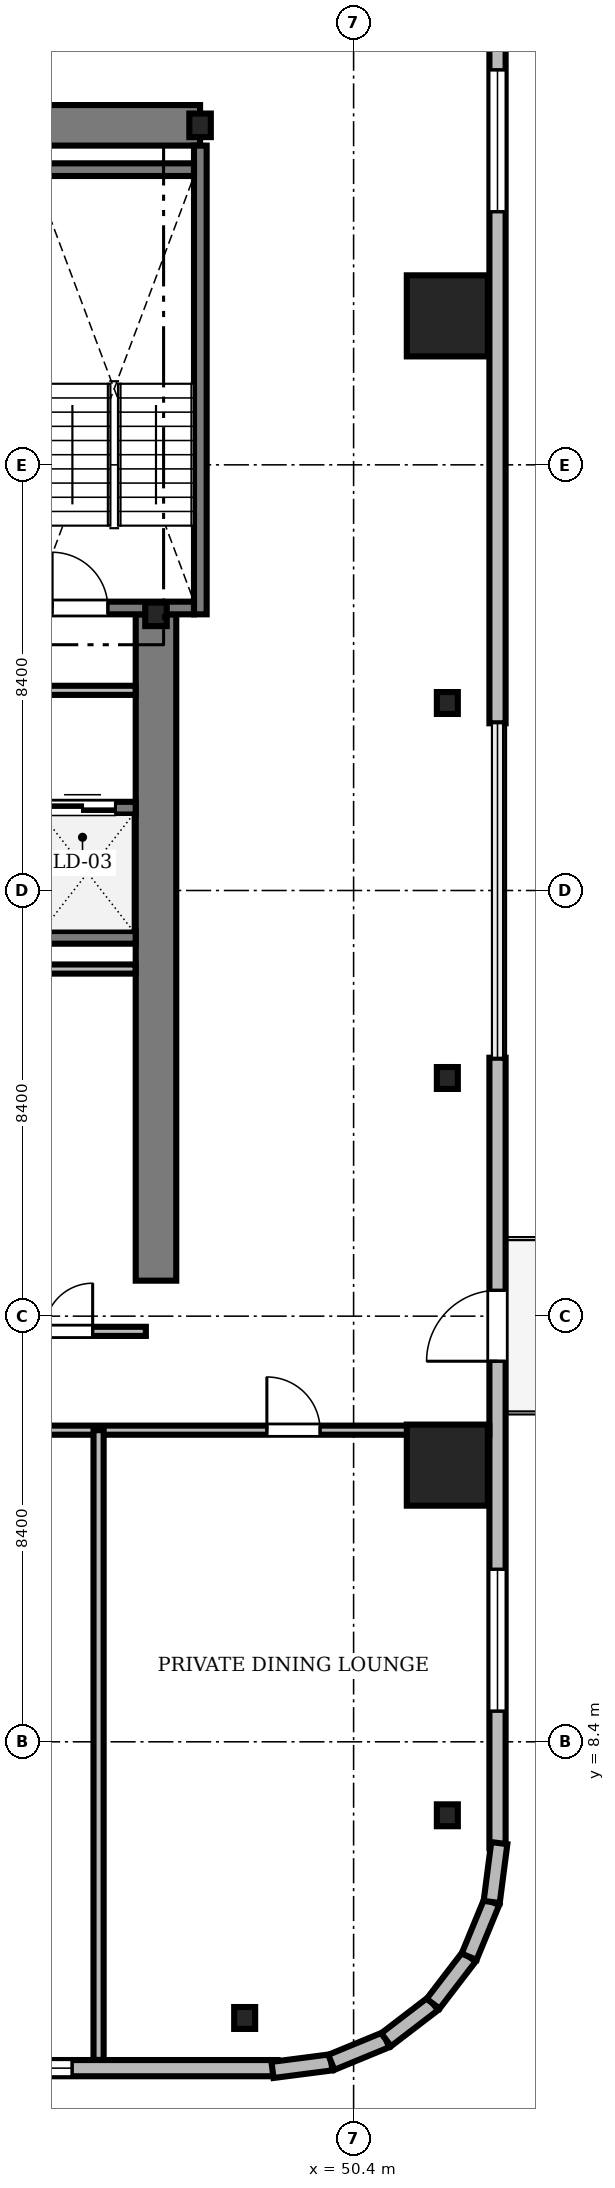
"""IFC4 building model, lengths in metres.
Left out: names, types, materials, properties, quantities, classifications, styles, units other than length and angle.
Written with IfcOpenShell. Run it as: python <this file> out.ifc"""

import sys

from ifc_helpers import new_model, si_unit, direction, frame, frame_2d, origin, origin_2d, place, context, subcontext, project, spatial, rectangle, i_section, extrude, source, transform, mapped, element, fill, save


model = new_model("IFC4")
c1 = context("Model", 3, precision=1e-05, world=origin(), true_north=direction((0.0, 1.0)))
c2 = subcontext(c1, "Body", "Model", "MODEL_VIEW")
j1 = project(units=[si_unit("LENGTHUNIT", "METRE"), si_unit("PLANEANGLEUNIT", "RADIAN")], contexts=[c1])
p1 = place(None, origin())
s1 = spatial("IfcSite", under=j1, at=p1, CompositionType="ELEMENT")
p2 = place(p1, origin())
s2 = spatial("IfcBuilding", under=s1, at=p2, CompositionType="ELEMENT")
p3 = place(p2, frame((0.0, 0.0, 148.3)))
s3 = spatial("IfcBuildingStorey", under=s2, at=p3, CompositionType="ELEMENT", Elevation=148.3)
m1 = source(origin(), c2, "Body", "SweptSolid", [
    extrude(rectangle(XDim=17.52, YDim=0.8, at=frame_2d((8.76, 0.0))), origin(), (0.0, 0.0, 1.0), 3.46),
])
p4 = place(p3, frame((29.85, 40.3, 0.0), z_axis=(0.0, 0.0, 1.0), x_axis=(1.0, 0.0, 0.0)))
e1 = element("IfcWall", 1, at=p4, inside=s3, PredefinedType="SHEAR", context=c2, shape_type="MappedRepresentation", body=[
    mapped(m1, transform((0.0, 0.0, 0.0), scale=1.0)),
])
m2 = source(origin(), c2, "Body", "SweptSolid", [
    extrude(rectangle(XDim=13.15, YDim=0.8, at=frame_2d((6.575, 0.0))), origin(), (0.0, 0.0, 1.0), 3.46),
])
p5 = place(p3, frame((46.5, 17.5, 0.0), z_axis=(0.0, 0.0, 1.0), x_axis=(0.0, 1.0, 0.0)))
e2 = element("IfcWall", 2, at=p5, inside=s3, PredefinedType="SHEAR", context=c2, shape_type="MappedRepresentation", body=[
    mapped(m2, transform((0.0, 0.0, 0.0), scale=1.0)),
])
m3 = source(origin(), c2, "Body", "SweptSolid", [
    extrude(i_section(OverallWidth=0.424, OverallDepth=0.465, WebThickness=0.035, FlangeThickness=0.056, FilletRadius=0.015, at=origin_2d()), origin(), (0.0, 0.0, 1.0), 3.46),
])
for number, where, z_axis, x_axis in (
    (3, (46.5, 30.65, 0.0), (0.0, 0.0, 1.0), (1.0, 0.0, 0.0)),
    (4, (47.37, 40.3, 0.0), (0.0, 0.0, 1.0), (1.0, 0.0, 0.0)),
):
    element("IfcColumn", number, at=place(p3, frame(where, z_axis=z_axis, x_axis=x_axis)), inside=s3, PredefinedType="COLUMN", context=c2, shape_type="MappedRepresentation", body=[
        mapped(m3, transform((0.0, 0.0, 0.0), scale=1.0)),
    ])
m4 = source(origin(), c2, "Body", "SweptSolid", [
    extrude(rectangle(XDim=1.6, YDim=1.6, at=origin_2d()), origin(), (0.0, 0.0, 1.0), 3.46),
])
for number, where, z_axis, x_axis in (
    (5, (52.25, 13.86, 0.0), (0.0, 0.0, 1.0), (1.0, 0.0, 0.0)),
    (6, (52.25, 36.54, 0.0), (0.0, 0.0, 1.0), (1.0, 0.0, 0.0)),
):
    element("IfcColumn", number, at=place(p3, frame(where, z_axis=z_axis, x_axis=x_axis)), inside=s3, PredefinedType="COLUMN", context=c2, shape_type="MappedRepresentation", body=[
        mapped(m4, transform((0.0, 0.0, 0.0), scale=1.0)),
    ])
m5 = source(origin(), c2, "Body", "SweptSolid", [
    extrude(i_section(OverallWidth=0.414, OverallDepth=0.432, WebThickness=0.026, FlangeThickness=0.04, FilletRadius=0.015, at=origin_2d()), origin(), (0.0, 0.0, 1.0), 3.46),
])
for number, where, z_axis, x_axis in (
    (7, (48.25, 2.95, 0.0), (0.0, 0.0, 1.0), (1.0, 0.0, 0.0)),
    (8, (52.25, 6.95, 0.0), (0.0, 0.0, 1.0), (1.0, 0.0, 0.0)),
    (9, (52.25, 21.5, 0.0), (0.0, 0.0, 1.0), (1.0, 0.0, 0.0)),
    (10, (52.25, 28.9, 0.0), (0.0, 0.0, 1.0), (1.0, 0.0, 0.0)),
):
    element("IfcColumn", number, at=place(p3, frame(where, z_axis=z_axis, x_axis=x_axis)), inside=s3, PredefinedType="COLUMN", context=c2, shape_type="MappedRepresentation", body=[
        mapped(m5, transform((0.0, 0.0, 0.0), scale=1.0)),
    ])
m6 = source(origin(), c2, "Body", "SweptSolid", [
    extrude(rectangle(XDim=15.6, YDim=0.32, at=frame_2d((7.8, 0.0))), origin(), (0.0, 0.0, 1.0), 3.46),
])
p6 = place(p3, frame((33.3, 1.96, 0.0), z_axis=(0.0, 0.0, 1.0), x_axis=(1.0, 0.0, 0.0)))
e11 = element("IfcWall", 11, at=p6, inside=s3, PredefinedType="SOLIDWALL", context=c2, shape_type="MappedRepresentation", body=[
    mapped(m6, transform((0.0, 0.0, 0.0), scale=1.0)),
])
m7 = source(origin(), c2, "Body", "SweptSolid", [
    extrude(rectangle(XDim=2.8, YDim=2.4, at=frame_2d((1.4, 1.2))), frame((0.0, 0.17, 0.0), z_axis=(0.0, -1.0, 0.0), x_axis=(1.0, 0.0, 0.0)), (0.0, 0.0, 1.0), 0.34),
])
p7 = place(p6, frame((8.745, 0.0, 0.72)))
e12 = element("IfcOpeningElement", 12, at=p7, cuts=e11, PredefinedType="OPENING", context=c2, shape_type="MappedRepresentation", body=[
    mapped(m7, transform((0.0, 0.0, 0.0), scale=1.0)),
])
p8 = place(p3, frame((53.24, 6.3, 0.0), z_axis=(0.0, 0.0, 1.0), x_axis=(0.0, 1.0, 0.0)))
e13 = element("IfcWall", 13, at=p8, inside=s3, PredefinedType="SOLIDWALL", context=c2, shape_type="MappedRepresentation", body=[
    mapped(m6, transform((0.0, 0.0, 0.0), scale=1.0)),
])
m8 = source(origin(), c2, "Body", "SweptSolid", [
    extrude(rectangle(XDim=1.4, YDim=2.3, at=frame_2d((0.7, 1.15))), frame((0.0, 0.17, 0.0), z_axis=(0.0, -1.0, 0.0), x_axis=(1.0, 0.0, 0.0)), (0.0, 0.0, 1.0), 0.34),
])
p9 = place(p8, frame((9.61, 0.0, 0.0)))
e14 = element("IfcOpeningElement", 14, at=p9, cuts=e13, PredefinedType="OPENING", context=c2, shape_type="MappedRepresentation", body=[
    mapped(m8, transform((0.0, 0.0, 0.0), scale=1.0)),
])
p10 = place(p8, frame((2.705, 0.0, 0.72)))
e15 = element("IfcOpeningElement", 15, at=p10, cuts=e13, PredefinedType="OPENING", context=c2, shape_type="MappedRepresentation", body=[
    mapped(m7, transform((0.0, 0.0, 0.0), scale=1.0)),
])
m9 = source(origin(), c2, "Body", "SweptSolid", [
    extrude(rectangle(XDim=15.6, YDim=0.32, at=frame_2d((7.8, 0.0))), origin(), (0.0, 0.0, 1.0), 3.46),
])
p11 = place(p3, frame((53.24, 28.5, 0.0), z_axis=(0.0, 0.0, 1.0), x_axis=(0.0, 1.0, 0.0)))
e16 = element("IfcWall", 16, at=p11, inside=s3, PredefinedType="SOLIDWALL", context=c2, shape_type="MappedRepresentation", body=[
    mapped(m9, transform((0.0, 0.0, 0.0), scale=1.0)),
])
p12 = place(p11, frame((10.095, 0.0, 0.72)))
e17 = element("IfcOpeningElement", 17, at=p12, cuts=e16, PredefinedType="OPENING", context=c2, shape_type="MappedRepresentation", body=[
    mapped(m7, transform((0.0, 0.0, 0.0), scale=1.0)),
])
m10 = source(origin(), c2, "Body", "SweptSolid", [
    extrude(rectangle(XDim=1.17, YDim=0.32, at=frame_2d((0.585, 0.0))), origin(), (0.0, 0.0, 1.0), 3.46),
])
p13 = place(p3, frame((48.8, 1.925, 0.0), z_axis=(0.0, 0.0, 1.0), x_axis=(0.991762485493, 0.128090485085, 0.0)))
e18 = element("IfcWall", 18, at=p13, inside=s3, PredefinedType="SOLIDWALL", context=c2, shape_type="MappedRepresentation", body=[
    mapped(m10, transform((0.0, 0.0, 0.0), scale=1.0)),
])
m11 = source(origin(), c2, "Body", "SweptSolid", [
    extrude(rectangle(XDim=1.169, YDim=0.32, at=frame_2d((0.585, 0.0))), origin(), (0.0, 0.0, 1.0), 3.46),
])
p14 = place(p3, frame((49.96, 2.074, 0.0), z_axis=(0.0, 0.0, 1.0), x_axis=(0.924479075121, 0.381232789334, 0.0)))
e19 = element("IfcWall", 19, at=p14, inside=s3, PredefinedType="SOLIDWALL", context=c2, shape_type="MappedRepresentation", body=[
    mapped(m11, transform((0.0, 0.0, 0.0), scale=1.0)),
])
m12 = source(origin(), c2, "Body", "SweptSolid", [
    extrude(rectangle(XDim=1.169, YDim=0.32, at=frame_2d((0.584, 0.0))), origin(), (0.0, 0.0, 1.0), 3.46),
])
p15 = place(p3, frame((51.041, 2.52, 0.0), z_axis=(0.0, 0.0, 1.0), x_axis=(0.793663520347, 0.608356981114, 0.0)))
e20 = element("IfcWall", 20, at=p15, inside=s3, PredefinedType="SOLIDWALL", context=c2, shape_type="MappedRepresentation", body=[
    mapped(m12, transform((0.0, 0.0, 0.0), scale=1.0)),
])
m13 = source(origin(), c2, "Body", "SweptSolid", [
    extrude(rectangle(XDim=1.169, YDim=0.32, at=frame_2d((0.584, 0.0))), origin(), (0.0, 0.0, 1.0), 3.46),
])
for number, where, z_axis, x_axis in (
    (21, (51.969, 3.231, 0.0), (0.0, 0.0, 1.0), (0.608, 0.794, 0.0)),
    (22, (52.68, 4.159, 0.0), (0.0, 0.0, 1.0), (0.381, 0.925, 0.0)),
):
    element("IfcWall", number, at=place(p3, frame(where, z_axis=z_axis, x_axis=x_axis)), inside=s3, PredefinedType="SOLIDWALL", context=c2, shape_type="MappedRepresentation", body=[
        mapped(m13, transform((0.0, 0.0, 0.0), scale=1.0)),
    ])
m14 = source(origin(), c2, "Body", "SweptSolid", [
    extrude(rectangle(XDim=1.171, YDim=0.32, at=frame_2d((0.585, 0.0))), origin(), (0.0, 0.0, 1.0), 3.46),
])
p16 = place(p3, frame((53.125, 5.24, 0.0), z_axis=(0.0, 0.0, 1.0), x_axis=(0.128269133229, 0.991739395941, 0.0)))
e23 = element("IfcWall", 23, at=p16, inside=s3, PredefinedType="SOLIDWALL", context=c2, shape_type="MappedRepresentation", body=[
    mapped(m14, transform((0.0, 0.0, 0.0), scale=1.0)),
])
m15 = source(origin(), c2, "Body", "SweptSolid", [
    extrude(rectangle(XDim=9.25, YDim=0.25, at=frame_2d((4.625, 0.0))), origin(), (0.0, 0.0, 1.0), 3.5),
])
p17 = place(p3, frame((47.375, 30.65, 0.0), z_axis=(0.0, 0.0, 1.0), x_axis=(0.0, 1.0, 0.0)))
e24 = element("IfcWall", 24, at=p17, inside=s3, PredefinedType="SOLIDWALL", context=c2, shape_type="MappedRepresentation", body=[
    mapped(m15, transform((0.0, 0.0, 0.0), scale=1.0)),
])
m16 = source(origin(), c2, "Body", "SweptSolid", [
    extrude(rectangle(XDim=3.15, YDim=0.25, at=frame_2d((1.575, 0.0))), origin(), (0.0, 0.0, 1.0), 3.5),
])
p18 = place(p3, frame((44.1, 39.425, 0.0), z_axis=(0.0, 0.0, 1.0), x_axis=(1.0, 0.0, 0.0)))
e25 = element("IfcWall", 25, at=p18, inside=s3, PredefinedType="SOLIDWALL", context=c2, shape_type="MappedRepresentation", body=[
    mapped(m16, transform((0.0, 0.0, 0.0), scale=1.0)),
])
p19 = place(p3, frame((44.1, 30.775, 0.0), z_axis=(0.0, 0.0, 1.0), x_axis=(1.0, 0.0, 0.0)))
e26 = element("IfcWall", 26, at=p19, inside=s3, PredefinedType="SOLIDWALL", context=c2, shape_type="MappedRepresentation", body=[
    mapped(m16, transform((0.0, 0.0, 0.0), scale=1.0)),
])
m17 = source(origin(), c2, "Body", "SweptSolid", [
    extrude(rectangle(XDim=1.1, YDim=2.2, at=frame_2d((0.55, 1.1))), frame((0.0, 0.135, 0.0), z_axis=(0.0, -1.0, 0.0), x_axis=(1.0, 0.0, 0.0)), (0.0, 0.0, 1.0), 0.27),
])
p20 = place(p19, frame((0.35, 0.0, 0.0)))
e27 = element("IfcOpeningElement", 27, at=p20, cuts=e26, PredefinedType="OPENING", context=c2, shape_type="MappedRepresentation", body=[
    mapped(m17, transform((0.0, 0.0, 0.0), scale=1.0)),
])
m18 = source(origin(), c2, "Body", "SweptSolid", [
    extrude(rectangle(XDim=2.1, YDim=0.25, at=frame_2d((1.05, 0.0))), origin(), (0.0, 0.0, 1.0), 3.46),
])
p21 = place(p3, frame((44.0, 24.275, 0.0), z_axis=(0.0, 0.0, 1.0), x_axis=(1.0, 0.0, 0.0)))
e28 = element("IfcWall", 28, at=p21, inside=s3, PredefinedType="SOLIDWALL", context=c2, shape_type="MappedRepresentation", body=[
    mapped(m18, transform((0.0, 0.0, 0.0), scale=1.0)),
])
p22 = place(p3, frame((44.0, 26.825, 0.0), z_axis=(0.0, 0.0, 1.0), x_axis=(1.0, 0.0, 0.0)))
e29 = element("IfcWall", 29, at=p22, inside=s3, PredefinedType="SOLIDWALL", context=c2, shape_type="MappedRepresentation", body=[
    mapped(m18, transform((0.0, 0.0, 0.0), scale=1.0)),
])
m19 = source(origin(), c2, "Body", "SweptSolid", [
    extrude(rectangle(XDim=1.3, YDim=2.3, at=frame_2d((0.65, 1.15))), frame((0.0, 0.135, 0.0), z_axis=(0.0, -1.0, 0.0), x_axis=(1.0, 0.0, 0.0)), (0.0, 0.0, 1.0), 0.27),
])
p23 = place(p22, frame((0.4, 0.0, 0.0)))
e30 = element("IfcOpeningElement", 30, at=p23, cuts=e29, PredefinedType="OPENING", context=c2, shape_type="MappedRepresentation", body=[
    mapped(m19, transform((0.0, 0.0, 0.0), scale=1.0)),
])
m20 = source(origin(), c2, "Body", "SweptSolid", [
    extrude(rectangle(XDim=46.156, YDim=0.18, at=frame_2d((23.078, 0.0))), origin(), (0.0, 0.0, 1.0), 2.702),
])
p24 = place(p3, frame((6.922, 14.55, 0.0), z_axis=(0.0, 0.0, 1.0), x_axis=(1.0, 0.0, 0.0)))
e31 = element("IfcWall", 31, at=p24, inside=s3, PredefinedType="PARTITIONING", context=c2, shape_type="MappedRepresentation", body=[
    mapped(m20, transform((0.0, 0.0, 0.0), scale=1.0)),
])
m21 = source(origin(), c2, "Body", "SweptSolid", [
    extrude(rectangle(XDim=1.05, YDim=2.2, at=frame_2d((0.525, 1.1))), frame((0.0, 0.1, 0.0), z_axis=(0.0, -1.0, 0.0), x_axis=(1.0, 0.0, 0.0)), (0.0, 0.0, 1.0), 0.2),
])
p25 = place(p24, frame((14.338, 0.0, 0.0)))
e32 = element("IfcOpeningElement", 32, at=p25, cuts=e31, PredefinedType="OPENING", context=c2, shape_type="MappedRepresentation", body=[
    mapped(m21, transform((0.0, 0.0, 0.0), scale=1.0)),
])
p26 = place(p24, frame((17.878, 0.0, 0.0)))
e33 = element("IfcOpeningElement", 33, at=p26, cuts=e31, PredefinedType="OPENING", context=c2, shape_type="MappedRepresentation", body=[
    mapped(m21, transform((0.0, 0.0, 0.0), scale=1.0)),
])
p27 = place(p24, frame((23.477, 0.0, 0.0)))
e34 = element("IfcOpeningElement", 34, at=p27, cuts=e31, PredefinedType="OPENING", context=c2, shape_type="MappedRepresentation", body=[
    mapped(m21, transform((0.0, 0.0, 0.0), scale=1.0)),
])
p28 = place(p24, frame((29.256, 0.0, 0.0)))
e35 = element("IfcOpeningElement", 35, at=p28, cuts=e31, PredefinedType="OPENING", context=c2, shape_type="MappedRepresentation", body=[
    mapped(m21, transform((0.0, 0.0, 0.0), scale=1.0)),
])
p29 = place(p24, frame((35.035, 0.0, 0.0)))
e36 = element("IfcOpeningElement", 36, at=p29, cuts=e31, PredefinedType="OPENING", context=c2, shape_type="MappedRepresentation", body=[
    mapped(m21, transform((0.0, 0.0, 0.0), scale=1.0)),
])
p30 = place(p24, frame((41.766, 0.0, 0.0)))
e37 = element("IfcOpeningElement", 37, at=p30, cuts=e31, PredefinedType="OPENING", context=c2, shape_type="MappedRepresentation", body=[
    mapped(m21, transform((0.0, 0.0, 0.0), scale=1.0)),
])
m22 = source(origin(), c2, "Body", "SweptSolid", [
    extrude(rectangle(XDim=4.548, YDim=0.18, at=frame_2d((2.274, 0.0))), origin(), (0.0, 0.0, 1.0), 3.092),
])
p31 = place(p3, frame((41.55, 29.15, 0.0), z_axis=(0.0, 0.0, 1.0), x_axis=(1.0, 0.0, 0.0)))
e38 = element("IfcWall", 38, at=p31, inside=s3, PredefinedType="PARTITIONING", context=c2, shape_type="MappedRepresentation", body=[
    mapped(m22, transform((0.0, 0.0, 0.0), scale=1.0)),
])
m23 = source(origin(), c2, "Body", "SweptSolid", [
    extrude(rectangle(XDim=1.2, YDim=2.2, at=frame_2d((0.6, 1.1))), frame((0.0, 0.1, 0.0), z_axis=(0.0, -1.0, 0.0), x_axis=(1.0, 0.0, 0.0)), (0.0, 0.0, 1.0), 0.2),
])
p32 = place(p31, frame((1.6, 0.0, 0.0)))
e39 = element("IfcOpeningElement", 39, at=p32, cuts=e38, PredefinedType="OPENING", context=c2, shape_type="MappedRepresentation", body=[
    mapped(m23, transform((0.0, 0.0, 0.0), scale=1.0)),
])
m24 = source(origin(), c2, "Body", "SweptSolid", [
    extrude(rectangle(XDim=4.7, YDim=0.18, at=frame_2d((2.35, 0.0))), origin(), (0.0, 0.0, 1.0), 2.852),
])
p33 = place(p3, frame((41.6, 16.5, 0.0), z_axis=(0.0, 0.0, 1.0), x_axis=(1.0, 0.0, 0.0)))
e40 = element("IfcWall", 40, at=p33, inside=s3, PredefinedType="PARTITIONING", context=c2, shape_type="MappedRepresentation", body=[
    mapped(m24, transform((0.0, 0.0, 0.0), scale=1.0)),
])
m25 = source(origin(), c2, "Body", "SweptSolid", [
    extrude(rectangle(XDim=0.95, YDim=2.15, at=frame_2d((0.475, 1.075))), frame((0.0, 0.1, 0.0), z_axis=(0.0, -1.0, 0.0), x_axis=(1.0, 0.0, 0.0)), (0.0, 0.0, 1.0), 0.2),
])
p34 = place(p33, frame((0.35, 0.0, 0.0)))
e41 = element("IfcOpeningElement", 41, at=p34, cuts=e40, PredefinedType="OPENING", context=c2, shape_type="MappedRepresentation", body=[
    mapped(m25, transform((0.0, 0.0, 0.0), scale=1.0)),
])
p35 = place(p33, frame((2.7, 0.0, 0.0)))
e42 = element("IfcOpeningElement", 42, at=p35, cuts=e40, PredefinedType="OPENING", context=c2, shape_type="MappedRepresentation", body=[
    mapped(m25, transform((0.0, 0.0, 0.0), scale=1.0)),
])
m26 = source(origin(), c2, "Body", "SweptSolid", [
    extrude(rectangle(XDim=12.428, YDim=0.2, at=frame_2d((6.214, 0.0))), origin(), (0.0, 0.0, 1.0), 2.702),
])
p36 = place(p3, frame((45.367, 2.122, 0.0), z_axis=(0.0, 0.0, 1.0), x_axis=(0.0, 1.0, 0.0)))
e43 = element("IfcWall", 43, at=p36, inside=s3, PredefinedType="PARTITIONING", context=c2, shape_type="MappedRepresentation", body=[
    mapped(m26, transform((0.0, 0.0, 0.0), scale=1.0)),
])
m27 = source(origin(), c2, "Body", "SweptSolid", [
    extrude(rectangle(XDim=4.498, YDim=0.18, at=frame_2d((2.249, 0.0))), origin(), (0.0, 0.0, 1.0), 3.46),
])
p37 = place(p3, frame((41.6, 23.65, 0.0), z_axis=(0.0, 0.0, 1.0), x_axis=(1.0, 0.0, 0.0)))
e44 = element("IfcWall", 44, at=p37, inside=s3, PredefinedType="PARTITIONING", context=c2, shape_type="MappedRepresentation", body=[
    mapped(m27, transform((0.0, 0.0, 0.0), scale=1.0)),
])
m28 = source(origin(), c2, "Body", "SweptSolid", [
    extrude(rectangle(XDim=2.8, YDim=2.4, at=frame_2d((1.4, 1.2))), frame((0.0, 0.03, 0.0), z_axis=(0.0, -1.0, 0.0), x_axis=(1.0, 0.0, 0.0)), (0.0, 0.0, 1.0), 0.06),
])
p38 = place(p7, origin())
e45 = element("IfcWindow", 45, at=p38, inside=s3, PartitioningType="SINGLE_PANEL", PredefinedType="WINDOW", context=c2, shape_type="MappedRepresentation", body=[
    mapped(m28, transform((0.0, 0.0, 0.0), scale=1.0)),
])
fill(e12, e45)
m29 = source(origin(), c2, "Body", "SweptSolid", [
    extrude(rectangle(XDim=1.4, YDim=2.3, at=frame_2d((0.7, 1.15))), frame((0.0, 0.025, 0.0), z_axis=(0.0, -1.0, 0.0), x_axis=(1.0, 0.0, 0.0)), (0.0, 0.0, 1.0), 0.05),
])
p39 = place(p9, frame((1.4, 0.0, 0.0), z_axis=(0.0, 0.0, 1.0), x_axis=(-1.0, 0.0, 0.0)))
e46 = element("IfcDoor", 46, at=p39, inside=s3, OperationType="DOUBLE_DOOR_SLIDING", PredefinedType="DOOR", context=c2, shape_type="MappedRepresentation", body=[
    mapped(m29, transform((0.0, 0.0, 0.0), scale=1.0)),
])
fill(e14, e46)
p40 = place(p10, origin())
e47 = element("IfcWindow", 47, at=p40, inside=s3, PartitioningType="SINGLE_PANEL", PredefinedType="WINDOW", context=c2, shape_type="MappedRepresentation", body=[
    mapped(m28, transform((0.0, 0.0, 0.0), scale=1.0)),
])
fill(e15, e47)
p41 = place(p12, origin())
e48 = element("IfcWindow", 48, at=p41, inside=s3, PartitioningType="SINGLE_PANEL", PredefinedType="WINDOW", context=c2, shape_type="MappedRepresentation", body=[
    mapped(m28, transform((0.0, 0.0, 0.0), scale=1.0)),
])
fill(e17, e48)
m30 = source(origin(), c2, "Body", "SweptSolid", [
    extrude(rectangle(XDim=1.1, YDim=2.2, at=frame_2d((0.55, 1.1))), frame((0.0, 0.025, 0.0), z_axis=(0.0, -1.0, 0.0), x_axis=(1.0, 0.0, 0.0)), (0.0, 0.0, 1.0), 0.05),
])
p42 = place(p20, origin())
e49 = element("IfcDoor", 49, at=p42, inside=s3, OperationType="SINGLE_SWING_LEFT", PredefinedType="DOOR", context=c2, shape_type="MappedRepresentation", body=[
    mapped(m30, transform((0.0, 0.0, 0.0), scale=1.0)),
])
fill(e27, e49)
m31 = source(origin(), c2, "Body", "SweptSolid", [
    extrude(rectangle(XDim=1.3, YDim=2.3, at=frame_2d((0.65, 1.15))), frame((0.0, 0.025, 0.0), z_axis=(0.0, -1.0, 0.0), x_axis=(1.0, 0.0, 0.0)), (0.0, 0.0, 1.0), 0.05),
])
p43 = place(p23, origin())
e50 = element("IfcDoor", 50, at=p43, inside=s3, OperationType="DOUBLE_DOOR_SLIDING", PredefinedType="DOOR", context=c2, shape_type="MappedRepresentation", body=[
    mapped(m31, transform((0.0, 0.0, 0.0), scale=1.0)),
])
fill(e30, e50)
m32 = source(origin(), c2, "Body", "SweptSolid", [
    extrude(rectangle(XDim=1.05, YDim=2.2, at=frame_2d((0.525, 1.1))), frame((0.0, 0.025, 0.0), z_axis=(0.0, -1.0, 0.0), x_axis=(1.0, 0.0, 0.0)), (0.0, 0.0, 1.0), 0.05),
])
p44 = place(p30, origin())
e51 = element("IfcDoor", 51, at=p44, inside=s3, OperationType="SINGLE_SWING_LEFT", PredefinedType="DOOR", context=c2, shape_type="MappedRepresentation", body=[
    mapped(m32, transform((0.0, 0.0, 0.0), scale=1.0)),
])
fill(e37, e51)
m33 = source(origin(), c2, "Body", "SweptSolid", [
    extrude(rectangle(XDim=0.95, YDim=2.15, at=frame_2d((0.475, 1.075))), frame((0.0, 0.025, 0.0), z_axis=(0.0, -1.0, 0.0), x_axis=(1.0, 0.0, 0.0)), (0.0, 0.0, 1.0), 0.05),
])
p45 = place(p35, origin())
e52 = element("IfcDoor", 52, at=p45, inside=s3, OperationType="SINGLE_SWING_RIGHT", PredefinedType="DOOR", context=c2, shape_type="MappedRepresentation", body=[
    mapped(m33, transform((0.0, 0.0, 0.0), scale=1.0)),
])
fill(e42, e52)
save(model, sys.argv[1])
